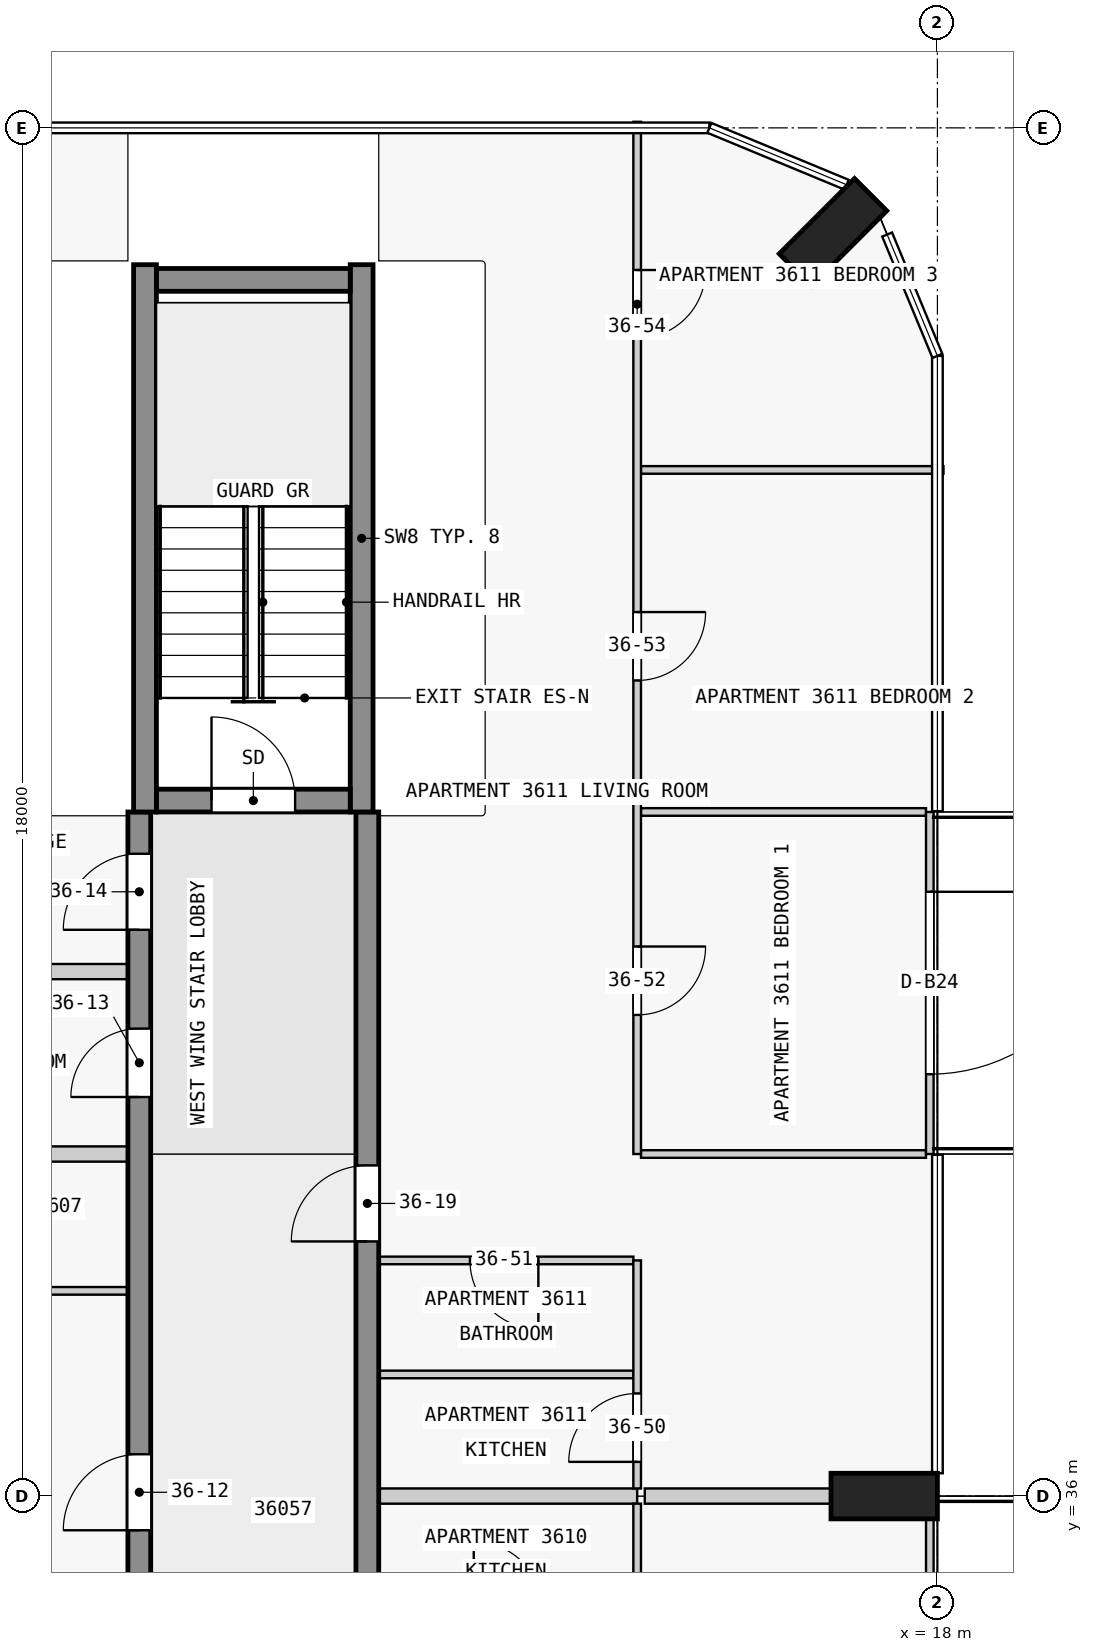
"""IFC4 building model, lengths in metres.
Left out: names, types, materials, properties, quantities, classifications, styles, units other than length and angle.
Written with IfcOpenShell. Run it as: python <this file> out.ifc"""

import sys

from ifc_helpers import new_model, si_unit, direction, frame, frame_2d, origin, origin_2d, place, context, subcontext, project, spatial, rectangle, extrude, element, fill, save


model = new_model("IFC4")
c1 = context("Model", 3, precision=1e-05, world=origin(), true_north=direction((0.0, 1.0)))
c2 = subcontext(c1, "Body", "Model", "MODEL_VIEW")
j1 = project(units=[si_unit("LENGTHUNIT", "METRE"), si_unit("PLANEANGLEUNIT", "RADIAN")], contexts=[c1])
p1 = place(None, origin())
s1 = spatial("IfcSite", under=j1, at=p1, CompositionType="ELEMENT")
p2 = place(p1, origin())
s2 = spatial("IfcBuilding", under=s1, at=p2, CompositionType="ELEMENT")
p3 = place(p2, frame((0.0, 0.0, 142.9)))
s3 = spatial("IfcBuildingStorey", under=s2, at=p3, CompositionType="ELEMENT", Elevation=142.9)
for number, where, z_axis, x_axis in (
    (1, (17.3, 36.0, 0.0), (0.0, 0.0, 1.0), (0.0, 1.0, 0.0)),
    (2, (16.626, 52.626, 0.0), (0.0, 0.0, 1.0), (-0.707, 0.707, 0.0)),
):
    element("IfcColumn", number, at=place(p3, frame(where, z_axis=z_axis, x_axis=x_axis)), inside=s3, PredefinedType="COLUMN", context=c2, shape_type="SweptSolid", body=[
        extrude(rectangle(XDim=0.6, YDim=1.4, at=origin_2d()), origin(), (0.0, 0.0, 1.0), 3.5),
    ])
p4 = place(p3, frame((7.725, 45.15, 0.0), z_axis=(0.0, 0.0, 1.0), x_axis=(1.0, 0.0, 0.0)))
e3 = element("IfcWall", 3, at=p4, inside=s3, PredefinedType="SHEAR", context=c2, shape_type="SweptSolid", body=[
    extrude(rectangle(XDim=2.55, YDim=0.3, at=frame_2d((1.275, 0.0))), origin(), (0.0, 0.0, 1.0), 3.5),
])
p5 = place(p4, frame((0.725, 0.0, 0.0)))
e4 = element("IfcOpeningElement", 4, at=p5, cuts=e3, PredefinedType="OPENING", context=c2, shape_type="SweptSolid", body=[
    extrude(rectangle(XDim=1.1, YDim=2.1, at=frame_2d((0.55, 1.05))), frame((0.0, 0.16, 0.0), z_axis=(0.0, -1.0, 0.0), x_axis=(1.0, 0.0, 0.0)), (0.0, 0.0, 1.0), 0.32),
])
p6 = place(p3, frame((7.725, 52.0, 0.0), z_axis=(0.0, 0.0, 1.0), x_axis=(1.0, 0.0, 0.0)))
e5 = element("IfcWall", 5, at=p6, inside=s3, PredefinedType="SHEAR", context=c2, shape_type="SweptSolid", body=[
    extrude(rectangle(XDim=2.55, YDim=0.3, at=frame_2d((1.275, 0.0))), origin(), (0.0, 0.0, 1.0), 3.5),
])
for number, where, z_axis, x_axis in (
    (6, (7.575, 45.0, 0.0), (0.0, 0.0, 1.0), (0.0, 1.0, 0.0)),
    (7, (10.425, 45.0, 0.0), (0.0, 0.0, 1.0), (0.0, 1.0, 0.0)),
):
    element("IfcWall", number, at=place(p3, frame(where, z_axis=z_axis, x_axis=x_axis)), inside=s3, PredefinedType="SHEAR", context=c2, shape_type="SweptSolid", body=[
        extrude(rectangle(XDim=7.2, YDim=0.3, at=frame_2d((3.6, 0.0))), origin(), (0.0, 0.0, 1.0), 3.5),
    ])
p7 = place(p3, frame((7.5, 18.0, 0.0), z_axis=(0.0, 0.0, 1.0), x_axis=(0.0, 1.0, 0.0)))
e8 = element("IfcWall", 8, at=p7, inside=s3, PredefinedType="SHEAR", context=c2, shape_type="SweptSolid", body=[
    extrude(rectangle(XDim=27.0, YDim=0.3, at=frame_2d((13.5, 0.0))), origin(), (0.0, 0.0, 1.0), 3.25),
])
p8 = place(p7, frame((4.05, 0.0, 0.0)))
e9 = element("IfcOpeningElement", 9, at=p8, cuts=e8, PredefinedType="OPENING", context=c2, shape_type="SweptSolid", body=[
    extrude(rectangle(XDim=1.0, YDim=2.1, at=frame_2d((0.5, 1.05))), frame((0.0, 0.16, 0.0), z_axis=(0.0, -1.0, 0.0), x_axis=(1.0, 0.0, 0.0)), (0.0, 0.0, 1.0), 0.32),
])
p9 = place(p7, frame((10.75, 0.0, 0.0)))
e10 = element("IfcOpeningElement", 10, at=p9, cuts=e8, PredefinedType="OPENING", context=c2, shape_type="SweptSolid", body=[
    extrude(rectangle(XDim=1.0, YDim=2.1, at=frame_2d((0.5, 1.05))), frame((0.0, 0.16, 0.0), z_axis=(0.0, -1.0, 0.0), x_axis=(1.0, 0.0, 0.0)), (0.0, 0.0, 1.0), 0.32),
])
p10 = place(p7, frame((17.55, 0.0, 0.0)))
e11 = element("IfcOpeningElement", 11, at=p10, cuts=e8, PredefinedType="OPENING", context=c2, shape_type="SweptSolid", body=[
    extrude(rectangle(XDim=1.0, YDim=2.1, at=frame_2d((0.5, 1.05))), frame((0.0, 0.16, 0.0), z_axis=(0.0, -1.0, 0.0), x_axis=(1.0, 0.0, 0.0)), (0.0, 0.0, 1.0), 0.32),
])
p11 = place(p7, frame((23.25, 0.0, 0.0)))
e12 = element("IfcOpeningElement", 12, at=p11, cuts=e8, PredefinedType="OPENING", context=c2, shape_type="SweptSolid", body=[
    extrude(rectangle(XDim=0.9, YDim=2.1, at=frame_2d((0.45, 1.05))), frame((0.0, 0.16, 0.0), z_axis=(0.0, -1.0, 0.0), x_axis=(1.0, 0.0, 0.0)), (0.0, 0.0, 1.0), 0.32),
])
p12 = place(p7, frame((25.45, 0.0, 0.0)))
e13 = element("IfcOpeningElement", 13, at=p12, cuts=e8, PredefinedType="OPENING", context=c2, shape_type="SweptSolid", body=[
    extrude(rectangle(XDim=1.0, YDim=2.1, at=frame_2d((0.5, 1.05))), frame((0.0, 0.16, 0.0), z_axis=(0.0, -1.0, 0.0), x_axis=(1.0, 0.0, 0.0)), (0.0, 0.0, 1.0), 0.32),
])
p13 = place(p3, frame((10.5, 18.0, 0.0), z_axis=(0.0, 0.0, 1.0), x_axis=(0.0, 1.0, 0.0)))
e14 = element("IfcWall", 14, at=p13, inside=s3, PredefinedType="SHEAR", context=c2, shape_type="SweptSolid", body=[
    extrude(rectangle(XDim=27.0, YDim=0.3, at=frame_2d((13.5, 0.0))), origin(), (0.0, 0.0, 1.0), 3.25),
])
p14 = place(p13, frame((1.75, 0.0, 0.0)))
e15 = element("IfcOpeningElement", 15, at=p14, cuts=e14, PredefinedType="OPENING", context=c2, shape_type="SweptSolid", body=[
    extrude(rectangle(XDim=1.0, YDim=2.1, at=frame_2d((0.5, 1.05))), frame((0.0, 0.16, 0.0), z_axis=(0.0, -1.0, 0.0), x_axis=(1.0, 0.0, 0.0)), (0.0, 0.0, 1.0), 0.32),
])
p15 = place(p13, frame((6.25, 0.0, 0.0)))
e16 = element("IfcOpeningElement", 16, at=p15, cuts=e14, PredefinedType="OPENING", context=c2, shape_type="SweptSolid", body=[
    extrude(rectangle(XDim=1.0, YDim=2.1, at=frame_2d((0.5, 1.05))), frame((0.0, 0.16, 0.0), z_axis=(0.0, -1.0, 0.0), x_axis=(1.0, 0.0, 0.0)), (0.0, 0.0, 1.0), 0.32),
])
p16 = place(p13, frame((10.35, 0.0, 0.0)))
e17 = element("IfcOpeningElement", 17, at=p16, cuts=e14, PredefinedType="OPENING", context=c2, shape_type="SweptSolid", body=[
    extrude(rectangle(XDim=1.8, YDim=2.1, at=frame_2d((0.9, 1.05))), frame((0.0, 0.16, 0.0), z_axis=(0.0, -1.0, 0.0), x_axis=(1.0, 0.0, 0.0)), (0.0, 0.0, 1.0), 0.32),
])
p17 = place(p13, frame((15.25, 0.0, 0.0)))
e18 = element("IfcOpeningElement", 18, at=p17, cuts=e14, PredefinedType="OPENING", context=c2, shape_type="SweptSolid", body=[
    extrude(rectangle(XDim=1.0, YDim=2.1, at=frame_2d((0.5, 1.05))), frame((0.0, 0.16, 0.0), z_axis=(0.0, -1.0, 0.0), x_axis=(1.0, 0.0, 0.0)), (0.0, 0.0, 1.0), 0.32),
])
p18 = place(p13, frame((21.35, 0.0, 0.0)))
e19 = element("IfcOpeningElement", 19, at=p18, cuts=e14, PredefinedType="OPENING", context=c2, shape_type="SweptSolid", body=[
    extrude(rectangle(XDim=1.0, YDim=2.1, at=frame_2d((0.5, 1.05))), frame((0.0, 0.16, 0.0), z_axis=(0.0, -1.0, 0.0), x_axis=(1.0, 0.0, 0.0)), (0.0, 0.0, 1.0), 0.32),
])
p19 = place(p3, frame((17.9, 36.0, 0.0), z_axis=(0.0, 0.0, 1.0), x_axis=(0.0, -1.0, 0.0)))
e20 = element("IfcWall", 20, at=p19, inside=s3, PredefinedType="STANDARD", context=c2, shape_type="SweptSolid", body=[
    extrude(rectangle(XDim=4.5, YDim=0.1, at=frame_2d((2.25, 0.0))), origin(), (0.0, 0.0, 1.0), 3.25),
])
p20 = place(p19, frame((1.05, 0.0, 0.0)))
e21 = element("IfcOpeningElement", 21, at=p20, cuts=e20, PredefinedType="OPENING", context=c2, shape_type="SweptSolid", body=[
    extrude(rectangle(XDim=2.4, YDim=2.4, at=frame_2d((1.2, 1.2))), frame((0.0, 0.06, 0.0), z_axis=(0.0, -1.0, 0.0), x_axis=(1.0, 0.0, 0.0)), (0.0, 0.0, 1.0), 0.12),
])
p21 = place(p3, frame((17.9, 45.0, 0.0), z_axis=(0.0, 0.0, 1.0), x_axis=(0.0, -1.0, 0.0)))
e22 = element("IfcWall", 22, at=p21, inside=s3, PredefinedType="STANDARD", context=c2, shape_type="SweptSolid", body=[
    extrude(rectangle(XDim=4.5, YDim=0.1, at=frame_2d((2.25, 0.0))), origin(), (0.0, 0.0, 1.0), 3.25),
])
p22 = place(p21, frame((1.05, 0.0, 0.0)))
e23 = element("IfcOpeningElement", 23, at=p22, cuts=e22, PredefinedType="OPENING", context=c2, shape_type="SweptSolid", body=[
    extrude(rectangle(XDim=2.4, YDim=2.4, at=frame_2d((1.2, 1.2))), frame((0.0, 0.06, 0.0), z_axis=(0.0, -1.0, 0.0), x_axis=(1.0, 0.0, 0.0)), (0.0, 0.0, 1.0), 0.12),
])
p23 = place(p3, frame((14.05, 36.0, 0.0), z_axis=(0.0, 0.0, 1.0), x_axis=(-1.0, 0.0, 0.0)))
e24 = element("IfcWall", 24, at=p23, inside=s3, PredefinedType="PARTITIONING", context=c2, shape_type="SweptSolid", body=[
    extrude(rectangle(XDim=3.4, YDim=0.2, at=frame_2d((1.7, 0.0))), origin(), (0.0, 0.0, 1.0), 3.25),
])
p24 = place(p3, frame((14.15, 36.0, 0.0), z_axis=(0.0, 0.0, 1.0), x_axis=(1.0, 0.0, 0.0)))
e25 = element("IfcWall", 25, at=p24, inside=s3, PredefinedType="PARTITIONING", context=c2, shape_type="SweptSolid", body=[
    extrude(rectangle(XDim=2.45, YDim=0.2, at=frame_2d((1.225, 0.0))), origin(), (0.0, 0.0, 1.0), 3.25),
])
p25 = place(p3, frame((14.0, 37.6, 0.0), z_axis=(0.0, 0.0, 1.0), x_axis=(-1.0, 0.0, 0.0)))
e26 = element("IfcWall", 26, at=p25, inside=s3, PredefinedType="PARTITIONING", context=c2, shape_type="SweptSolid", body=[
    extrude(rectangle(XDim=3.35, YDim=0.1, at=frame_2d((1.675, 0.0))), origin(), (0.0, 0.0, 1.0), 3.25),
])
p26 = place(p3, frame((3.95, 38.7, 0.0), z_axis=(0.0, 0.0, 1.0), x_axis=(1.0, 0.0, 0.0)))
e27 = element("IfcWall", 27, at=p26, inside=s3, PredefinedType="PARTITIONING", context=c2, shape_type="SweptSolid", body=[
    extrude(rectangle(XDim=3.4, YDim=0.1, at=frame_2d((1.7, 0.0))), origin(), (0.0, 0.0, 1.0), 3.25),
])
p27 = place(p26, frame((1.25, 0.0, 0.0)))
e28 = element("IfcOpeningElement", 28, at=p27, cuts=e27, PredefinedType="OPENING", context=c2, shape_type="SweptSolid", body=[
    extrude(rectangle(XDim=0.9, YDim=2.1, at=frame_2d((0.45, 1.05))), frame((0.0, 0.06, 0.0), z_axis=(0.0, -1.0, 0.0), x_axis=(1.0, 0.0, 0.0)), (0.0, 0.0, 1.0), 0.12),
])
p28 = place(p3, frame((14.0, 39.1, 0.0), z_axis=(0.0, 0.0, 1.0), x_axis=(-1.0, 0.0, 0.0)))
e29 = element("IfcWall", 29, at=p28, inside=s3, PredefinedType="PARTITIONING", context=c2, shape_type="SweptSolid", body=[
    extrude(rectangle(XDim=3.35, YDim=0.1, at=frame_2d((1.675, 0.0))), origin(), (0.0, 0.0, 1.0), 3.25),
])
p29 = place(p28, frame((1.25, 0.0, 0.0)))
e30 = element("IfcOpeningElement", 30, at=p29, cuts=e29, PredefinedType="OPENING", context=c2, shape_type="SweptSolid", body=[
    extrude(rectangle(XDim=0.9, YDim=2.1, at=frame_2d((0.45, 1.05))), frame((0.0, 0.06, 0.0), z_axis=(0.0, -1.0, 0.0), x_axis=(1.0, 0.0, 0.0)), (0.0, 0.0, 1.0), 0.12),
])
p30 = place(p3, frame((14.1, 40.5, 0.0), z_axis=(0.0, 0.0, 1.0), x_axis=(1.0, 0.0, 0.0)))
e31 = element("IfcWall", 31, at=p30, inside=s3, PredefinedType="PARTITIONING", context=c2, shape_type="SweptSolid", body=[
    extrude(rectangle(XDim=3.75, YDim=0.1, at=frame_2d((1.875, 0.0))), origin(), (0.0, 0.0, 1.0), 3.25),
])
p31 = place(p3, frame((7.35, 40.5, 0.0), z_axis=(0.0, 0.0, 1.0), x_axis=(-1.0, 0.0, 0.0)))
e32 = element("IfcWall", 32, at=p31, inside=s3, PredefinedType="PARTITIONING", context=c2, shape_type="SweptSolid", body=[
    extrude(rectangle(XDim=7.43, YDim=0.2, at=frame_2d((3.715, 0.0))), origin(), (0.0, 0.0, 1.0), 3.25),
])
p32 = place(p3, frame((7.35, 42.9, 0.0), z_axis=(0.0, 0.0, 1.0), x_axis=(-1.0, 0.0, 0.0)))
e33 = element("IfcWall", 33, at=p32, inside=s3, PredefinedType="PARTITIONING", context=c2, shape_type="SweptSolid", body=[
    extrude(rectangle(XDim=3.4, YDim=0.2, at=frame_2d((1.7, 0.0))), origin(), (0.0, 0.0, 1.0), 3.25),
])
p33 = place(p3, frame((17.85, 45.0, 0.0), z_axis=(0.0, 0.0, 1.0), x_axis=(-1.0, 0.0, 0.0)))
e34 = element("IfcWall", 34, at=p33, inside=s3, PredefinedType="PARTITIONING", context=c2, shape_type="SweptSolid", body=[
    extrude(rectangle(XDim=3.75, YDim=0.1, at=frame_2d((1.875, 0.0))), origin(), (0.0, 0.0, 1.0), 3.25),
])
p34 = place(p3, frame((18.08, 49.5, 0.0), z_axis=(0.0, 0.0, 1.0), x_axis=(-1.0, 0.0, 0.0)))
e35 = element("IfcWall", 35, at=p34, inside=s3, PredefinedType="PARTITIONING", context=c2, shape_type="SweptSolid", body=[
    extrude(rectangle(XDim=3.98, YDim=0.1, at=frame_2d((1.99, 0.0))), origin(), (0.0, 0.0, 1.0), 3.25),
])
p35 = place(p3, frame((14.05, 54.08, 0.0), z_axis=(0.0, 0.0, 1.0), x_axis=(0.0, -1.0, 0.0)))
e36 = element("IfcWall", 36, at=p35, inside=s3, PredefinedType="PARTITIONING", context=c2, shape_type="SweptSolid", body=[
    extrude(rectangle(XDim=13.58, YDim=0.1, at=frame_2d((6.79, 0.0))), origin(), (0.0, 0.0, 1.0), 3.25),
])
p36 = place(p35, frame((10.85, 0.0, 0.0)))
e37 = element("IfcOpeningElement", 37, at=p36, cuts=e36, PredefinedType="OPENING", context=c2, shape_type="SweptSolid", body=[
    extrude(rectangle(XDim=0.9, YDim=2.1, at=frame_2d((0.45, 1.05))), frame((0.0, 0.06, 0.0), z_axis=(0.0, -1.0, 0.0), x_axis=(1.0, 0.0, 0.0)), (0.0, 0.0, 1.0), 0.12),
])
p37 = place(p35, frame((6.45, 0.0, 0.0)))
e38 = element("IfcOpeningElement", 38, at=p37, cuts=e36, PredefinedType="OPENING", context=c2, shape_type="SweptSolid", body=[
    extrude(rectangle(XDim=0.9, YDim=2.1, at=frame_2d((0.45, 1.05))), frame((0.0, 0.06, 0.0), z_axis=(0.0, -1.0, 0.0), x_axis=(1.0, 0.0, 0.0)), (0.0, 0.0, 1.0), 0.12),
])
p38 = place(p35, frame((1.95, 0.0, 0.0)))
e39 = element("IfcOpeningElement", 39, at=p38, cuts=e36, PredefinedType="OPENING", context=c2, shape_type="SweptSolid", body=[
    extrude(rectangle(XDim=0.9, YDim=2.1, at=frame_2d((0.45, 1.05))), frame((0.0, 0.06, 0.0), z_axis=(0.0, -1.0, 0.0), x_axis=(1.0, 0.0, 0.0)), (0.0, 0.0, 1.0), 0.12),
])
p39 = place(p3, frame((14.05, 34.5, 0.0), z_axis=(0.0, 0.0, 1.0), x_axis=(0.0, 1.0, 0.0)))
e40 = element("IfcWall", 40, at=p39, inside=s3, PredefinedType="PARTITIONING", context=c2, shape_type="SweptSolid", body=[
    extrude(rectangle(XDim=1.4, YDim=0.1, at=frame_2d((0.7, 0.0))), origin(), (0.0, 0.0, 1.0), 3.25),
])
p40 = place(p3, frame((14.05, 36.1, 0.0), z_axis=(0.0, 0.0, 1.0), x_axis=(0.0, 1.0, 0.0)))
e41 = element("IfcWall", 41, at=p40, inside=s3, PredefinedType="PARTITIONING", context=c2, shape_type="SweptSolid", body=[
    extrude(rectangle(XDim=3.0, YDim=0.1, at=frame_2d((1.5, 0.0))), origin(), (0.0, 0.0, 1.0), 3.25),
])
p41 = place(p40, frame((0.35, 0.0, 0.0)))
e42 = element("IfcOpeningElement", 42, at=p41, cuts=e41, PredefinedType="OPENING", context=c2, shape_type="SweptSolid", body=[
    extrude(rectangle(XDim=0.9, YDim=2.1, at=frame_2d((0.45, 1.05))), frame((0.0, 0.06, 0.0), z_axis=(0.0, -1.0, 0.0), x_axis=(1.0, 0.0, 0.0)), (0.0, 0.0, 1.0), 0.12),
])
p42 = place(p22, origin())
e43 = element("IfcDoor", 43, at=p42, inside=s3, OperationType="SINGLE_SWING_LEFT", PredefinedType="DOOR", context=c2, shape_type="SweptSolid", body=[
    extrude(rectangle(XDim=2.4, YDim=2.4, at=frame_2d((1.2, 1.2))), frame((0.0, 0.025, 0.0), z_axis=(0.0, -1.0, 0.0), x_axis=(1.0, 0.0, 0.0)), (0.0, 0.0, 1.0), 0.05),
])
fill(e23, e43)
p43 = place(p5, origin())
e44 = element("IfcDoor", 44, at=p43, inside=s3, OperationType="SINGLE_SWING_LEFT", PredefinedType="DOOR", context=c2, shape_type="SweptSolid", body=[
    extrude(rectangle(XDim=1.1, YDim=2.1, at=frame_2d((0.55, 1.05))), frame((0.0, 0.025, 0.0), z_axis=(0.0, -1.0, 0.0), x_axis=(1.0, 0.0, 0.0)), (0.0, 0.0, 1.0), 0.05),
])
fill(e4, e44)
p44 = place(p10, origin())
e45 = element("IfcDoor", 45, at=p44, inside=s3, OperationType="SINGLE_SWING_RIGHT", PredefinedType="DOOR", context=c2, shape_type="SweptSolid", body=[
    extrude(rectangle(XDim=1.0, YDim=2.1, at=frame_2d((0.5, 1.05))), frame((0.0, 0.025, 0.0), z_axis=(0.0, -1.0, 0.0), x_axis=(1.0, 0.0, 0.0)), (0.0, 0.0, 1.0), 0.05),
])
fill(e11, e45)
p45 = place(p11, origin())
e46 = element("IfcDoor", 46, at=p45, inside=s3, OperationType="SINGLE_SWING_RIGHT", PredefinedType="DOOR", context=c2, shape_type="SweptSolid", body=[
    extrude(rectangle(XDim=0.9, YDim=2.1, at=frame_2d((0.45, 1.05))), frame((0.0, 0.025, 0.0), z_axis=(0.0, -1.0, 0.0), x_axis=(1.0, 0.0, 0.0)), (0.0, 0.0, 1.0), 0.05),
])
fill(e12, e46)
p46 = place(p12, origin())
e47 = element("IfcDoor", 47, at=p46, inside=s3, OperationType="SINGLE_SWING_RIGHT", PredefinedType="DOOR", context=c2, shape_type="SweptSolid", body=[
    extrude(rectangle(XDim=1.0, YDim=2.1, at=frame_2d((0.5, 1.05))), frame((0.0, 0.025, 0.0), z_axis=(0.0, -1.0, 0.0), x_axis=(1.0, 0.0, 0.0)), (0.0, 0.0, 1.0), 0.05),
])
fill(e13, e47)
p47 = place(p18, origin())
e48 = element("IfcDoor", 48, at=p47, inside=s3, OperationType="SINGLE_SWING_RIGHT", PredefinedType="DOOR", context=c2, shape_type="SweptSolid", body=[
    extrude(rectangle(XDim=1.0, YDim=2.1, at=frame_2d((0.5, 1.05))), frame((0.0, 0.025, 0.0), z_axis=(0.0, -1.0, 0.0), x_axis=(1.0, 0.0, 0.0)), (0.0, 0.0, 1.0), 0.05),
])
fill(e19, e48)
p48 = place(p41, origin())
e49 = element("IfcDoor", 49, at=p48, inside=s3, OperationType="SINGLE_SWING_LEFT", PredefinedType="DOOR", context=c2, shape_type="SweptSolid", body=[
    extrude(rectangle(XDim=0.9, YDim=2.1, at=frame_2d((0.45, 1.05))), frame((0.0, 0.025, 0.0), z_axis=(0.0, -1.0, 0.0), x_axis=(1.0, 0.0, 0.0)), (0.0, 0.0, 1.0), 0.05),
])
fill(e42, e49)
p49 = place(p29, origin())
e50 = element("IfcDoor", 50, at=p49, inside=s3, OperationType="SINGLE_SWING_RIGHT", PredefinedType="DOOR", context=c2, shape_type="SweptSolid", body=[
    extrude(rectangle(XDim=0.9, YDim=2.1, at=frame_2d((0.45, 1.05))), frame((0.0, 0.025, 0.0), z_axis=(0.0, -1.0, 0.0), x_axis=(1.0, 0.0, 0.0)), (0.0, 0.0, 1.0), 0.05),
])
fill(e30, e50)
p50 = place(p36, origin())
e51 = element("IfcDoor", 51, at=p50, inside=s3, OperationType="SINGLE_SWING_RIGHT", PredefinedType="DOOR", context=c2, shape_type="SweptSolid", body=[
    extrude(rectangle(XDim=0.9, YDim=2.1, at=frame_2d((0.45, 1.05))), frame((0.0, 0.025, 0.0), z_axis=(0.0, -1.0, 0.0), x_axis=(1.0, 0.0, 0.0)), (0.0, 0.0, 1.0), 0.05),
])
fill(e37, e51)
p51 = place(p37, origin())
e52 = element("IfcDoor", 52, at=p51, inside=s3, OperationType="SINGLE_SWING_RIGHT", PredefinedType="DOOR", context=c2, shape_type="SweptSolid", body=[
    extrude(rectangle(XDim=0.9, YDim=2.1, at=frame_2d((0.45, 1.05))), frame((0.0, 0.025, 0.0), z_axis=(0.0, -1.0, 0.0), x_axis=(1.0, 0.0, 0.0)), (0.0, 0.0, 1.0), 0.05),
])
fill(e38, e52)
p52 = place(p38, origin())
e53 = element("IfcDoor", 53, at=p52, inside=s3, OperationType="SINGLE_SWING_LEFT", PredefinedType="DOOR", context=c2, shape_type="SweptSolid", body=[
    extrude(rectangle(XDim=0.9, YDim=2.1, at=frame_2d((0.45, 1.05))), frame((0.0, 0.025, 0.0), z_axis=(0.0, -1.0, 0.0), x_axis=(1.0, 0.0, 0.0)), (0.0, 0.0, 1.0), 0.05),
])
fill(e39, e53)
save(model, sys.argv[1])
